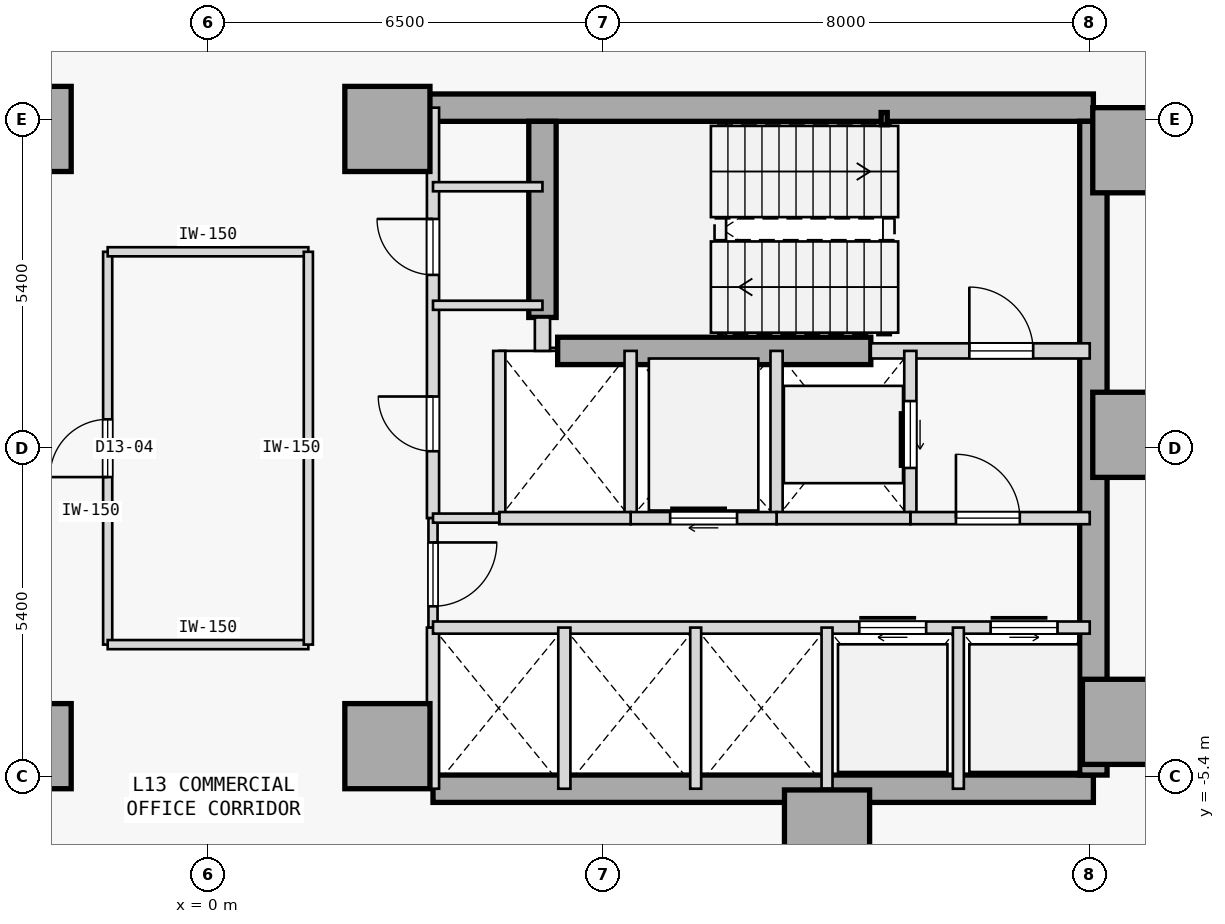
"""IFC4 building model, lengths in metres.
Left out: names, types, materials, properties, quantities, classifications, styles, units other than length and angle.
Written with IfcOpenShell. Run it as: python <this file> out.ifc"""

import sys

from ifc_helpers import new_model, si_unit, direction, frame, frame_2d, origin, origin_2d, place, context, subcontext, project, spatial, rectangle, hollow_rectangle, extrude, element, fill, save


model = new_model("IFC4")
c1 = context("Model", 3, precision=1e-05, world=origin(), true_north=direction((0.0, 1.0)))
c2 = subcontext(c1, "Body", "Model", "MODEL_VIEW")
j1 = project(units=[si_unit("LENGTHUNIT", "METRE"), si_unit("PLANEANGLEUNIT", "RADIAN")], contexts=[c1])
p1 = place(None, origin())
s1 = spatial("IfcSite", under=j1, at=p1, CompositionType="ELEMENT")
p2 = place(p1, origin())
s2 = spatial("IfcBuilding", under=s1, at=p2, CompositionType="ELEMENT")
p3 = place(p2, frame((0.0, 0.0, 56.0)))
s3 = spatial("IfcBuildingStorey", under=s2, at=p3, CompositionType="ELEMENT", Elevation=56.0)
for number, where, z_axis, x_axis in (
    (1, (-2.95, -4.9, 0.0), (0.0, 0.0, 1.0), (1.0, 0.0, 0.0)),
    (2, (-2.95, 5.25, 0.0), (0.0, 0.0, 1.0), (1.0, 0.0, 0.0)),
    (3, (15.25, 4.9, 0.0), (0.0, 0.0, 1.0), (1.0, 0.0, 0.0)),
    (4, (15.25, 0.22, 0.0), (0.0, 0.0, 1.0), (1.0, 0.0, 0.0)),
    (5, (15.08, -4.5, 0.0), (0.0, 0.0, 1.0), (1.0, 0.0, 0.0)),
    (6, (10.18, -6.32, 0.0), (0.0, 0.0, 1.0), (1.0, 0.0, 0.0)),
    (7, (2.95, -4.9, 0.0), (0.0, 0.0, 1.0), (1.0, 0.0, 0.0)),
    (8, (2.95, 5.25, 0.0), (0.0, 0.0, 1.0), (1.0, 0.0, 0.0)),
):
    element("IfcColumn", number, at=place(p3, frame(where, z_axis=z_axis, x_axis=x_axis)), inside=s3, PredefinedType="COLUMN", context=c2, shape_type="SweptSolid", body=[
        extrude(rectangle(XDim=1.4, YDim=1.4, at=origin_2d()), origin(), (0.0, 0.0, 1.0), 3.8),
    ])
p4 = place(p3, frame((3.15, 5.6, 0.0), z_axis=(0.0, 0.0, 1.0), x_axis=(1.0, 0.0, 0.0)))
e9 = element("IfcWall", 9, at=p4, inside=s3, PredefinedType="SHEAR", context=c2, shape_type="SweptSolid", body=[
    extrude(rectangle(XDim=11.41, YDim=0.45, at=frame_2d((5.705, 0.0))), origin(), (0.0, 0.0, 1.0), 3.575),
])
p5 = place(p3, frame((3.7, -5.6, 0.0), z_axis=(0.0, 0.0, 1.0), x_axis=(1.0, 0.0, 0.0)))
e10 = element("IfcWall", 10, at=p5, inside=s3, PredefinedType="SHEAR", context=c2, shape_type="SweptSolid", body=[
    extrude(rectangle(XDim=10.86, YDim=0.45, at=frame_2d((5.43, 0.0))), origin(), (0.0, 0.0, 1.0), 3.575),
])
p6 = place(p3, frame((14.56, -5.375, 0.0), z_axis=(0.0, 0.0, 1.0), x_axis=(0.0, 1.0, 0.0)))
e11 = element("IfcWall", 11, at=p6, inside=s3, PredefinedType="SHEAR", context=c2, shape_type="SweptSolid", body=[
    extrude(rectangle(XDim=10.75, YDim=0.45, at=frame_2d((5.375, 0.0))), origin(), (0.0, 0.0, 1.0), 3.575),
])
p7 = place(p3, frame((5.5, 2.15, 0.0), z_axis=(0.0, 0.0, 1.0), x_axis=(0.0, 1.0, 0.0)))
e12 = element("IfcWall", 12, at=p7, inside=s3, PredefinedType="SHEAR", context=c2, shape_type="SweptSolid", body=[
    extrude(rectangle(XDim=3.225, YDim=0.45, at=frame_2d((1.613, 0.0))), origin(), (0.0, 0.0, 1.0), 3.575),
])
p8 = place(p3, frame((5.75, 1.6, 0.0), z_axis=(0.0, 0.0, 1.0), x_axis=(1.0, 0.0, 0.0)))
e13 = element("IfcWall", 13, at=p8, inside=s3, PredefinedType="SHEAR", context=c2, shape_type="SweptSolid", body=[
    extrude(rectangle(XDim=5.15, YDim=0.45, at=frame_2d((2.575, 0.0))), origin(), (0.0, 0.0, 1.0), 3.575),
])
p9 = place(p3, frame((11.12, 5.42, 0.0), z_axis=(0.0, 0.0, 1.0), x_axis=(1.0, 0.0, 0.0)))
e14 = element("IfcColumn", 14, at=p9, inside=s3, PredefinedType="COLUMN", context=c2, shape_type="SweptSolid", body=[
    extrude(hollow_rectangle(XDim=0.1, YDim=0.2, WallThickness=0.008, at=origin_2d()), origin(), (0.0, 0.0, 1.0), 3.8),
])
p10 = place(p3, frame((10.9, 1.6, 0.0), z_axis=(0.0, 0.0, 1.0), x_axis=(1.0, 0.0, 0.0)))
e15 = element("IfcWall", 15, at=p10, inside=s3, PredefinedType="STANDARD", context=c2, shape_type="SweptSolid", body=[
    extrude(rectangle(XDim=3.6, YDim=0.25, at=frame_2d((1.8, 0.0))), origin(), (0.0, 0.0, 1.0), 3.575),
])
p11 = place(p10, frame((1.62, 0.0, 0.0)))
e16 = element("IfcOpeningElement", 16, at=p11, cuts=e15, PredefinedType="OPENING", context=c2, shape_type="SweptSolid", body=[
    extrude(rectangle(XDim=1.05, YDim=2.15, at=frame_2d((0.525, 1.075))), frame((0.0, 0.135, 0.0), z_axis=(0.0, -1.0, 0.0), x_axis=(1.0, 0.0, 0.0)), (0.0, 0.0, 1.0), 0.27),
])
p12 = place(p3, frame((5.5, 1.6, 0.0), z_axis=(0.0, 0.0, 1.0), x_axis=(0.0, 1.0, 0.0)))
e17 = element("IfcWall", 17, at=p12, inside=s3, PredefinedType="STANDARD", context=c2, shape_type="SweptSolid", body=[
    extrude(rectangle(XDim=0.55, YDim=0.25, at=frame_2d((0.275, 0.0))), origin(), (0.0, 0.0, 1.0), 3.575),
])
p13 = place(p3, frame((3.7, -1.15, 0.0), z_axis=(0.0, 0.0, 1.0), x_axis=(0.0, 1.0, 0.0)))
e18 = element("IfcWall", 18, at=p13, inside=s3, PredefinedType="STANDARD", context=c2, shape_type="SweptSolid", body=[
    extrude(rectangle(XDim=6.75, YDim=0.2, at=frame_2d((3.375, 0.0))), origin(), (0.0, 0.0, 1.0), 3.575),
])
p14 = place(p13, frame((1.1, 0.0, 0.0)))
e19 = element("IfcOpeningElement", 19, at=p14, cuts=e18, PredefinedType="OPENING", context=c2, shape_type="SweptSolid", body=[
    extrude(rectangle(XDim=0.9, YDim=2.15, at=frame_2d((0.45, 1.075))), frame((0.0, 0.11, 0.0), z_axis=(0.0, -1.0, 0.0), x_axis=(1.0, 0.0, 0.0)), (0.0, 0.0, 1.0), 0.22),
])
p15 = place(p13, frame((4.0, 0.0, 0.0)))
e20 = element("IfcOpeningElement", 20, at=p15, cuts=e18, PredefinedType="OPENING", context=c2, shape_type="SweptSolid", body=[
    extrude(rectangle(XDim=0.92, YDim=2.15, at=frame_2d((0.46, 1.075))), frame((0.0, 0.11, 0.0), z_axis=(0.0, -1.0, 0.0), x_axis=(1.0, 0.0, 0.0)), (0.0, 0.0, 1.0), 0.22),
])
p16 = place(p3, frame((3.7, -2.95, 0.0), z_axis=(0.0, 0.0, 1.0), x_axis=(0.0, 1.0, 0.0)))
e21 = element("IfcWall", 21, at=p16, inside=s3, PredefinedType="PARTITIONING", context=c2, shape_type="SweptSolid", body=[
    extrude(rectangle(XDim=1.8, YDim=0.15, at=frame_2d((0.9, 0.0))), origin(), (0.0, 0.0, 1.0), 3.575),
])
p17 = place(p16, frame((0.35, 0.0, 0.0)))
e22 = element("IfcOpeningElement", 22, at=p17, cuts=e21, PredefinedType="OPENING", context=c2, shape_type="SweptSolid", body=[
    extrude(rectangle(XDim=1.05, YDim=2.18, at=frame_2d((0.525, 1.09))), frame((0.0, 0.085, 0.0), z_axis=(0.0, -1.0, 0.0), x_axis=(1.0, 0.0, 0.0)), (0.0, 0.0, 1.0), 0.17),
])
p18 = place(p3, frame((3.7, -5.6, 0.0), z_axis=(0.0, 0.0, 1.0), x_axis=(0.0, 1.0, 0.0)))
e23 = element("IfcWall", 23, at=p18, inside=s3, PredefinedType="STANDARD", context=c2, shape_type="SweptSolid", body=[
    extrude(rectangle(XDim=2.65, YDim=0.2, at=frame_2d((1.325, 0.0))), origin(), (0.0, 0.0, 1.0), 3.575),
])
p19 = place(p3, frame((11.55, -1.15, 0.0), z_axis=(0.0, 0.0, 1.0), x_axis=(0.0, 1.0, 0.0)))
e24 = element("IfcWall", 24, at=p19, inside=s3, PredefinedType="STANDARD", context=c2, shape_type="SweptSolid", body=[
    extrude(rectangle(XDim=2.75, YDim=0.2, at=frame_2d((1.375, 0.0))), origin(), (0.0, 0.0, 1.0), 3.575),
])
p20 = place(p19, frame((0.825, 0.0, 0.0)))
e25 = element("IfcOpeningElement", 25, at=p20, cuts=e24, PredefinedType="OPENING", context=c2, shape_type="SweptSolid", body=[
    extrude(rectangle(XDim=1.1, YDim=2.15, at=frame_2d((0.55, 1.075))), frame((0.0, 0.11, 0.0), z_axis=(0.0, -1.0, 0.0), x_axis=(1.0, 0.0, 0.0)), (0.0, 0.0, 1.0), 0.22),
])
p21 = place(p3, frame((9.35, -1.15, 0.0), z_axis=(0.0, 0.0, 1.0), x_axis=(0.0, 1.0, 0.0)))
e26 = element("IfcWall", 26, at=p21, inside=s3, PredefinedType="STANDARD", context=c2, shape_type="SweptSolid", body=[
    extrude(rectangle(XDim=2.75, YDim=0.2, at=frame_2d((1.375, 0.0))), origin(), (0.0, 0.0, 1.0), 3.575),
])
p22 = place(p3, frame((11.55, -1.15, 0.0), z_axis=(0.0, 0.0, 1.0), x_axis=(1.0, 0.0, 0.0)))
e27 = element("IfcWall", 27, at=p22, inside=s3, PredefinedType="STANDARD", context=c2, shape_type="SweptSolid", body=[
    extrude(rectangle(XDim=2.95, YDim=0.2, at=frame_2d((1.475, 0.0))), origin(), (0.0, 0.0, 1.0), 3.575),
])
p23 = place(p22, frame((0.75, 0.0, 0.0)))
e28 = element("IfcOpeningElement", 28, at=p23, cuts=e27, PredefinedType="OPENING", context=c2, shape_type="SweptSolid", body=[
    extrude(rectangle(XDim=1.05, YDim=2.18, at=frame_2d((0.525, 1.09))), frame((0.0, 0.11, 0.0), z_axis=(0.0, -1.0, 0.0), x_axis=(1.0, 0.0, 0.0)), (0.0, 0.0, 1.0), 0.22),
])
p24 = place(p3, frame((9.35, -1.15, 0.0), z_axis=(0.0, 0.0, 1.0), x_axis=(1.0, 0.0, 0.0)))
e29 = element("IfcWall", 29, at=p24, inside=s3, PredefinedType="STANDARD", context=c2, shape_type="SweptSolid", body=[
    extrude(rectangle(XDim=2.2, YDim=0.2, at=frame_2d((1.1, 0.0))), origin(), (0.0, 0.0, 1.0), 3.575),
])
p25 = place(p3, frame((6.95, -1.15, 0.0), z_axis=(0.0, 0.0, 1.0), x_axis=(0.0, 1.0, 0.0)))
e30 = element("IfcWall", 30, at=p25, inside=s3, PredefinedType="STANDARD", context=c2, shape_type="SweptSolid", body=[
    extrude(rectangle(XDim=2.75, YDim=0.2, at=frame_2d((1.375, 0.0))), origin(), (0.0, 0.0, 1.0), 3.575),
])
p26 = place(p3, frame((6.95, -1.15, 0.0), z_axis=(0.0, 0.0, 1.0), x_axis=(1.0, 0.0, 0.0)))
e31 = element("IfcWall", 31, at=p26, inside=s3, PredefinedType="STANDARD", context=c2, shape_type="SweptSolid", body=[
    extrude(rectangle(XDim=2.4, YDim=0.2, at=frame_2d((1.2, 0.0))), origin(), (0.0, 0.0, 1.0), 3.575),
])
p27 = place(p26, frame((0.65, 0.0, 0.0)))
e32 = element("IfcOpeningElement", 32, at=p27, cuts=e31, PredefinedType="OPENING", context=c2, shape_type="SweptSolid", body=[
    extrude(rectangle(XDim=1.1, YDim=2.15, at=frame_2d((0.55, 1.075))), frame((0.0, 0.11, 0.0), z_axis=(0.0, -1.0, 0.0), x_axis=(1.0, 0.0, 0.0)), (0.0, 0.0, 1.0), 0.22),
])
p28 = place(p3, frame((4.79, -1.15, 0.0), z_axis=(0.0, 0.0, 1.0), x_axis=(0.0, 1.0, 0.0)))
e33 = element("IfcWall", 33, at=p28, inside=s3, PredefinedType="STANDARD", context=c2, shape_type="SweptSolid", body=[
    extrude(rectangle(XDim=2.75, YDim=0.2, at=frame_2d((1.375, 0.0))), origin(), (0.0, 0.0, 1.0), 3.575),
])
p29 = place(p3, frame((4.79, -1.15, 0.0), z_axis=(0.0, 0.0, 1.0), x_axis=(1.0, 0.0, 0.0)))
e34 = element("IfcWall", 34, at=p29, inside=s3, PredefinedType="STANDARD", context=c2, shape_type="SweptSolid", body=[
    extrude(rectangle(XDim=2.16, YDim=0.2, at=frame_2d((1.08, 0.0))), origin(), (0.0, 0.0, 1.0), 3.575),
])
p30 = place(p3, frame((3.7, -1.15, 0.0), z_axis=(0.0, 0.0, 1.0), x_axis=(1.0, 0.0, 0.0)))
e35 = element("IfcWall", 35, at=p30, inside=s3, PredefinedType="PARTITIONING", context=c2, shape_type="SweptSolid", body=[
    extrude(rectangle(XDim=1.09, YDim=0.15, at=frame_2d((0.545, 0.0))), origin(), (0.0, 0.0, 1.0), 3.575),
])
p31 = place(p3, frame((3.7, -2.95, 0.0), z_axis=(0.0, 0.0, 1.0), x_axis=(1.0, 0.0, 0.0)))
e36 = element("IfcWall", 36, at=p31, inside=s3, PredefinedType="STANDARD", context=c2, shape_type="SweptSolid", body=[
    extrude(rectangle(XDim=10.8, YDim=0.2, at=frame_2d((5.4, 0.0))), origin(), (0.0, 0.0, 1.0), 3.575),
])
p32 = place(p31, frame((7.01, 0.0, 0.0)))
e37 = element("IfcOpeningElement", 37, at=p32, cuts=e36, PredefinedType="OPENING", context=c2, shape_type="SweptSolid", body=[
    extrude(rectangle(XDim=1.1, YDim=2.15, at=frame_2d((0.55, 1.075))), frame((0.0, 0.11, 0.0), z_axis=(0.0, -1.0, 0.0), x_axis=(1.0, 0.0, 0.0)), (0.0, 0.0, 1.0), 0.22),
])
p33 = place(p31, frame((9.17, 0.0, 0.0)))
e38 = element("IfcOpeningElement", 38, at=p33, cuts=e36, PredefinedType="OPENING", context=c2, shape_type="SweptSolid", body=[
    extrude(rectangle(XDim=1.1, YDim=2.15, at=frame_2d((0.55, 1.075))), frame((0.0, 0.11, 0.0), z_axis=(0.0, -1.0, 0.0), x_axis=(1.0, 0.0, 0.0)), (0.0, 0.0, 1.0), 0.22),
])
p34 = place(p3, frame((5.86, -5.6, 0.0), z_axis=(0.0, 0.0, 1.0), x_axis=(0.0, 1.0, 0.0)))
e39 = element("IfcWall", 39, at=p34, inside=s3, PredefinedType="STANDARD", context=c2, shape_type="SweptSolid", body=[
    extrude(rectangle(XDim=2.65, YDim=0.2, at=frame_2d((1.325, 0.0))), origin(), (0.0, 0.0, 1.0), 3.575),
])
for number, where, z_axis, x_axis in (
    (40, (12.34, -5.6, 0.0), (0.0, 0.0, 1.0), (0.0, 1.0, 0.0)),
    (41, (10.18, -5.6, 0.0), (0.0, 0.0, 1.0), (0.0, 1.0, 0.0)),
    (42, (8.02, -5.6, 0.0), (0.0, 0.0, 1.0), (0.0, 1.0, 0.0)),
):
    element("IfcWall", number, at=place(p3, frame(where, z_axis=z_axis, x_axis=x_axis)), inside=s3, PredefinedType="STANDARD", context=c2, shape_type="SweptSolid", body=[
        extrude(rectangle(XDim=2.65, YDim=0.18, at=frame_2d((1.325, 0.0))), origin(), (0.0, 0.0, 1.0), 3.575),
    ])
for number, where, z_axis, x_axis in (
    (43, (3.7, 4.3, 0.0), (0.0, 0.0, 1.0), (1.0, 0.0, 0.0)),
    (44, (3.7, 2.35, 0.0), (0.0, 0.0, 1.0), (1.0, 0.0, 0.0)),
):
    element("IfcWall", number, at=place(p3, frame(where, z_axis=z_axis, x_axis=x_axis)), inside=s3, PredefinedType="PARTITIONING", context=c2, shape_type="SweptSolid", body=[
        extrude(rectangle(XDim=1.8, YDim=0.15, at=frame_2d((0.9, 0.0))), origin(), (0.0, 0.0, 1.0), 3.575),
    ])
p35 = place(p3, frame((-1.65, -3.23, 0.0), z_axis=(0.0, 0.0, 1.0), x_axis=(0.0, 1.0, 0.0)))
e45 = element("IfcWall", 45, at=p35, inside=s3, PredefinedType="PARTITIONING", context=c2, shape_type="SweptSolid", body=[
    extrude(rectangle(XDim=6.46, YDim=0.15, at=frame_2d((3.23, 0.0))), origin(), (0.0, 0.0, 1.0), 3.575),
])
p36 = place(p35, frame((2.755, 0.0, 0.0)))
e46 = element("IfcOpeningElement", 46, at=p36, cuts=e45, PredefinedType="OPENING", context=c2, shape_type="SweptSolid", body=[
    extrude(rectangle(XDim=0.95, YDim=2.15, at=frame_2d((0.475, 1.075))), frame((0.0, 0.085, 0.0), z_axis=(0.0, -1.0, 0.0), x_axis=(1.0, 0.0, 0.0)), (0.0, 0.0, 1.0), 0.17),
])
for number, where, z_axis, x_axis in (
    (47, (-1.65, -3.23, 0.0), (0.0, 0.0, 1.0), (1.0, 0.0, 0.0)),
    (48, (-1.65, 3.23, 0.0), (0.0, 0.0, 1.0), (1.0, 0.0, 0.0)),
):
    element("IfcWall", number, at=place(p3, frame(where, z_axis=z_axis, x_axis=x_axis)), inside=s3, PredefinedType="PARTITIONING", context=c2, shape_type="SweptSolid", body=[
        extrude(rectangle(XDim=3.3, YDim=0.15, at=frame_2d((1.65, 0.0))), origin(), (0.0, 0.0, 1.0), 3.575),
    ])
p37 = place(p3, frame((1.65, -3.23, 0.0), z_axis=(0.0, 0.0, 1.0), x_axis=(0.0, 1.0, 0.0)))
e49 = element("IfcWall", 49, at=p37, inside=s3, PredefinedType="PARTITIONING", context=c2, shape_type="SweptSolid", body=[
    extrude(rectangle(XDim=6.46, YDim=0.15, at=frame_2d((3.23, 0.0))), origin(), (0.0, 0.0, 1.0), 3.575),
])
p38 = place(p11, origin())
e50 = element("IfcDoor", 50, at=p38, inside=s3, OperationType="SINGLE_SWING_LEFT", PredefinedType="DOOR", context=c2, shape_type="SweptSolid", body=[
    extrude(rectangle(XDim=1.05, YDim=2.15, at=frame_2d((0.525, 1.075))), frame((0.0, 0.025, 0.0), z_axis=(0.0, -1.0, 0.0), x_axis=(1.0, 0.0, 0.0)), (0.0, 0.0, 1.0), 0.05),
])
fill(e16, e50)
p39 = place(p23, origin())
e51 = element("IfcDoor", 51, at=p39, inside=s3, OperationType="SINGLE_SWING_LEFT", PredefinedType="DOOR", context=c2, shape_type="SweptSolid", body=[
    extrude(rectangle(XDim=1.05, YDim=2.18, at=frame_2d((0.525, 1.09))), frame((0.0, 0.025, 0.0), z_axis=(0.0, -1.0, 0.0), x_axis=(1.0, 0.0, 0.0)), (0.0, 0.0, 1.0), 0.05),
])
fill(e28, e51)
p40 = place(p17, frame((1.05, 0.0, 0.0), z_axis=(0.0, 0.0, 1.0), x_axis=(-1.0, 0.0, 0.0)))
e52 = element("IfcDoor", 52, at=p40, inside=s3, OperationType="SINGLE_SWING_RIGHT", PredefinedType="DOOR", context=c2, shape_type="SweptSolid", body=[
    extrude(rectangle(XDim=1.05, YDim=2.18, at=frame_2d((0.525, 1.09))), frame((0.0, 0.025, 0.0), z_axis=(0.0, -1.0, 0.0), x_axis=(1.0, 0.0, 0.0)), (0.0, 0.0, 1.0), 0.05),
])
fill(e22, e52)
p41 = place(p20, origin())
e53 = element("IfcDoor", 53, at=p41, inside=s3, OperationType="SLIDING_TO_RIGHT", PredefinedType="DOOR", context=c2, shape_type="SweptSolid", body=[
    extrude(rectangle(XDim=1.1, YDim=2.15, at=frame_2d((0.55, 1.075))), frame((0.0, 0.025, 0.0), z_axis=(0.0, -1.0, 0.0), x_axis=(1.0, 0.0, 0.0)), (0.0, 0.0, 1.0), 0.05),
])
fill(e25, e53)
p42 = place(p27, origin())
e54 = element("IfcDoor", 54, at=p42, inside=s3, OperationType="SLIDING_TO_RIGHT", PredefinedType="DOOR", context=c2, shape_type="SweptSolid", body=[
    extrude(rectangle(XDim=1.1, YDim=2.15, at=frame_2d((0.55, 1.075))), frame((0.0, 0.025, 0.0), z_axis=(0.0, -1.0, 0.0), x_axis=(1.0, 0.0, 0.0)), (0.0, 0.0, 1.0), 0.05),
])
fill(e32, e54)
p43 = place(p32, origin())
e55 = element("IfcDoor", 55, at=p43, inside=s3, OperationType="SLIDING_TO_RIGHT", PredefinedType="DOOR", context=c2, shape_type="SweptSolid", body=[
    extrude(rectangle(XDim=1.1, YDim=2.15, at=frame_2d((0.55, 1.075))), frame((0.0, 0.025, 0.0), z_axis=(0.0, -1.0, 0.0), x_axis=(1.0, 0.0, 0.0)), (0.0, 0.0, 1.0), 0.05),
])
fill(e37, e55)
p44 = place(p33, origin())
e56 = element("IfcDoor", 56, at=p44, inside=s3, OperationType="SLIDING_TO_LEFT", PredefinedType="DOOR", context=c2, shape_type="SweptSolid", body=[
    extrude(rectangle(XDim=1.1, YDim=2.15, at=frame_2d((0.55, 1.075))), frame((0.0, 0.025, 0.0), z_axis=(0.0, -1.0, 0.0), x_axis=(1.0, 0.0, 0.0)), (0.0, 0.0, 1.0), 0.05),
])
fill(e38, e56)
p45 = place(p14, origin())
e57 = element("IfcDoor", 57, at=p45, inside=s3, OperationType="SINGLE_SWING_RIGHT", PredefinedType="DOOR", context=c2, shape_type="SweptSolid", body=[
    extrude(rectangle(XDim=0.9, YDim=2.15, at=frame_2d((0.45, 1.075))), frame((0.0, 0.025, 0.0), z_axis=(0.0, -1.0, 0.0), x_axis=(1.0, 0.0, 0.0)), (0.0, 0.0, 1.0), 0.05),
])
fill(e19, e57)
p46 = place(p15, origin())
e58 = element("IfcDoor", 58, at=p46, inside=s3, OperationType="SINGLE_SWING_RIGHT", PredefinedType="DOOR", context=c2, shape_type="SweptSolid", body=[
    extrude(rectangle(XDim=0.92, YDim=2.15, at=frame_2d((0.46, 1.075))), frame((0.0, 0.025, 0.0), z_axis=(0.0, -1.0, 0.0), x_axis=(1.0, 0.0, 0.0)), (0.0, 0.0, 1.0), 0.05),
])
fill(e20, e58)
p47 = place(p36, origin())
e59 = element("IfcDoor", 59, at=p47, inside=s3, OperationType="SINGLE_SWING_LEFT", PredefinedType="DOOR", context=c2, shape_type="SweptSolid", body=[
    extrude(rectangle(XDim=0.95, YDim=2.15, at=frame_2d((0.475, 1.075))), frame((0.0, 0.025, 0.0), z_axis=(0.0, -1.0, 0.0), x_axis=(1.0, 0.0, 0.0)), (0.0, 0.0, 1.0), 0.05),
])
fill(e46, e59)
save(model, sys.argv[1])
